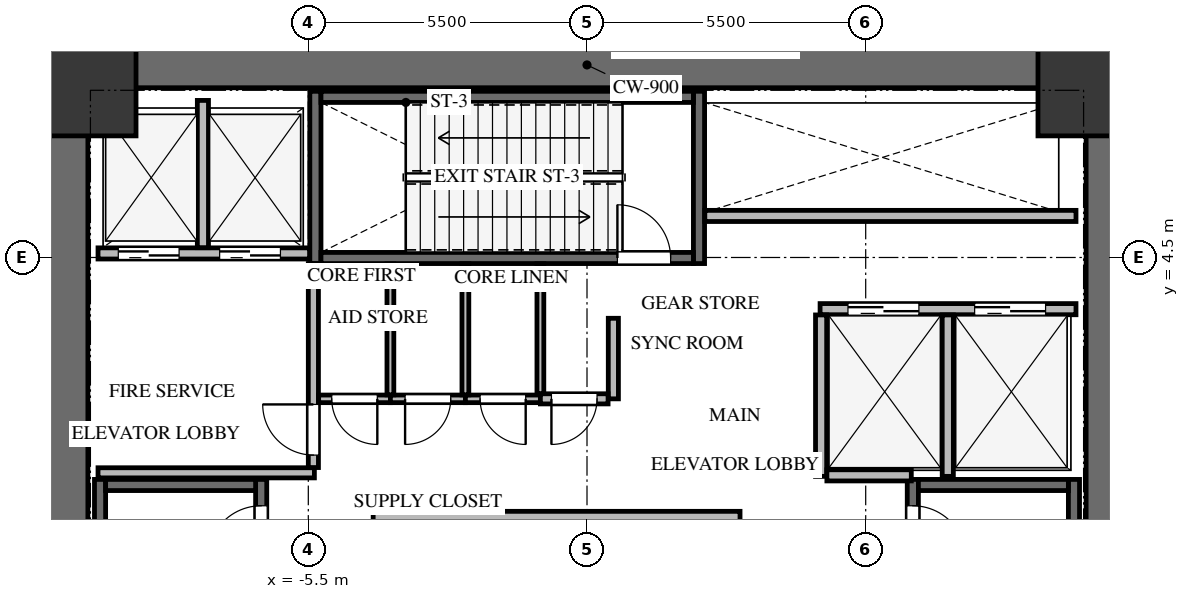
"""IFC4 building model, lengths in metres.
Left out: names, types, materials, properties, quantities, classifications, styles, units other than length and angle.
Written with IfcOpenShell. Run it as: python <this file> out.ifc"""

import sys

from ifc_helpers import new_model, si_unit, direction, frame, frame_2d, origin, origin_2d, place, context, subcontext, project, spatial, rectangle, extrude, source, transform, mapped, element, fill, save


model = new_model("IFC4")
c1 = context("Model", 3, precision=1e-05, world=origin(), true_north=direction((0.0, 1.0)))
c2 = subcontext(c1, "Body", "Model", "MODEL_VIEW")
j1 = project(units=[si_unit("LENGTHUNIT", "METRE"), si_unit("PLANEANGLEUNIT", "RADIAN")], contexts=[c1])
p1 = place(None, origin())
s1 = spatial("IfcSite", under=j1, at=p1, CompositionType="ELEMENT")
p2 = place(p1, origin())
s2 = spatial("IfcBuilding", under=s1, at=p2, CompositionType="ELEMENT")
p3 = place(p2, frame((0.0, 0.0, 26.8)))
s3 = spatial("IfcBuildingStorey", under=s2, at=p3, CompositionType="ELEMENT", Elevation=26.8)
for number, where, z_axis, x_axis in (
    (1, (-10.3, -8.75, 0.0), (0.0, 0.0, 1.0), (0.0, 1.0, 0.0)),
    (2, (10.3, -8.75, 0.0), (0.0, 0.0, 1.0), (0.0, 1.0, 0.0)),
):
    element("IfcWall", number, at=place(p3, frame(where, z_axis=z_axis, x_axis=x_axis)), inside=s3, PredefinedType="SHEAR", context=c2, shape_type="SweptSolid", body=[
        extrude(rectangle(XDim=17.5, YDim=0.9, at=frame_2d((8.75, 0.0))), origin(), (0.0, 0.0, 1.0), 5.6),
    ])
p4 = place(p3, frame((-9.85, 8.3, 0.0), z_axis=(0.0, 0.0, 1.0), x_axis=(1.0, 0.0, 0.0)))
e3 = element("IfcWall", 3, at=p4, inside=s3, PredefinedType="SHEAR", context=c2, shape_type="SweptSolid", body=[
    extrude(rectangle(XDim=19.7, YDim=0.9, at=frame_2d((9.85, 0.0))), origin(), (0.0, 0.0, 1.0), 5.6),
])
p5 = place(p3, frame((-6.43, -7.77, -0.32), z_axis=(0.0, 0.0, 1.0), x_axis=(0.0, 1.0, 0.0)))
e4 = element("IfcWall", 4, at=p5, inside=s3, PredefinedType="SHEAR", context=c2, shape_type="SweptSolid", body=[
    extrude(rectangle(XDim=7.89, YDim=0.22, at=frame_2d((3.945, 0.0))), origin(), (0.0, 0.0, 1.0), 5.68),
])
p6 = place(p5, frame((6.32, 0.0, 0.0)))
e5 = element("IfcOpeningElement", 5, at=p6, cuts=e4, PredefinedType="OPENING", context=c2, shape_type="SweptSolid", body=[
    extrude(rectangle(XDim=1.05, YDim=2.15, at=frame_2d((0.525, 1.075))), frame((0.0, 0.12, 0.0), z_axis=(0.0, -1.0, 0.0), x_axis=(1.0, 0.0, 0.0)), (0.0, 0.0, 1.0), 0.24),
])
p7 = place(p3, frame((-9.61, 0.12, -0.32), z_axis=(0.0, 0.0, 1.0), x_axis=(0.0, -1.0, 0.0)))
e6 = element("IfcWall", 6, at=p7, inside=s3, PredefinedType="SHEAR", context=c2, shape_type="SweptSolid", body=[
    extrude(rectangle(XDim=7.89, YDim=0.22, at=frame_2d((3.945, 0.0))), origin(), (0.0, 0.0, 1.0), 5.68),
])
p8 = place(p3, frame((-6.54, 0.01, -0.32), z_axis=(0.0, 0.0, 1.0), x_axis=(-1.0, 0.0, 0.0)))
e7 = element("IfcWall", 7, at=p8, inside=s3, PredefinedType="SHEAR", context=c2, shape_type="SweptSolid", body=[
    extrude(rectangle(XDim=2.96, YDim=0.22, at=frame_2d((1.48, 0.0))), origin(), (0.0, 0.0, 1.0), 5.68),
])
p9 = place(p3, frame((9.61, -7.77, -0.32), z_axis=(0.0, 0.0, 1.0), x_axis=(0.0, 1.0, 0.0)))
e8 = element("IfcWall", 8, at=p9, inside=s3, PredefinedType="SHEAR", context=c2, shape_type="SweptSolid", body=[
    extrude(rectangle(XDim=7.89, YDim=0.22, at=frame_2d((3.945, 0.0))), origin(), (0.0, 0.0, 1.0), 5.68),
])
p10 = place(p3, frame((6.43, 0.12, -0.32), z_axis=(0.0, 0.0, 1.0), x_axis=(0.0, -1.0, 0.0)))
e9 = element("IfcWall", 9, at=p10, inside=s3, PredefinedType="SHEAR", context=c2, shape_type="SweptSolid", body=[
    extrude(rectangle(XDim=7.89, YDim=0.22, at=frame_2d((3.945, 0.0))), origin(), (0.0, 0.0, 1.0), 5.68),
])
p11 = place(p10, frame((0.52, 0.0, 0.0)))
e10 = element("IfcOpeningElement", 10, at=p11, cuts=e9, PredefinedType="OPENING", context=c2, shape_type="SweptSolid", body=[
    extrude(rectangle(XDim=1.05, YDim=2.15, at=frame_2d((0.525, 1.075))), frame((0.0, 0.12, 0.0), z_axis=(0.0, -1.0, 0.0), x_axis=(1.0, 0.0, 0.0)), (0.0, 0.0, 1.0), 0.24),
])
p12 = place(p3, frame((9.5, 0.01, -0.32), z_axis=(0.0, 0.0, 1.0), x_axis=(-1.0, 0.0, 0.0)))
e11 = element("IfcWall", 11, at=p12, inside=s3, PredefinedType="SHEAR", context=c2, shape_type="SweptSolid", body=[
    extrude(rectangle(XDim=2.96, YDim=0.22, at=frame_2d((1.48, 0.0))), origin(), (0.0, 0.0, 1.0), 5.68),
])
for number, where, z_axis, x_axis in (
    (12, (2.21, 4.38, -0.32), (0.0, 0.0, 1.0), (0.0, 1.0, 0.0)),
    (13, (-5.36, 7.78, -0.32), (0.0, 0.0, 1.0), (0.0, -1.0, 0.0)),
):
    element("IfcWall", number, at=place(p3, frame(where, z_axis=z_axis, x_axis=x_axis)), inside=s3, PredefinedType="SHEAR", context=c2, shape_type="SweptSolid", body=[
        extrude(rectangle(XDim=3.4, YDim=0.22, at=frame_2d((1.7, 0.0))), origin(), (0.0, 0.0, 1.0), 5.68),
    ])
p13 = place(p3, frame((-5.25, 4.49, -0.32), z_axis=(0.0, 0.0, 1.0), x_axis=(1.0, 0.0, 0.0)))
e14 = element("IfcWall", 14, at=p13, inside=s3, PredefinedType="SHEAR", context=c2, shape_type="SweptSolid", body=[
    extrude(rectangle(XDim=7.35, YDim=0.22, at=frame_2d((3.675, 0.0))), origin(), (0.0, 0.0, 1.0), 5.68),
])
p14 = place(p13, frame((5.85, 0.0, 0.0)))
e15 = element("IfcOpeningElement", 15, at=p14, cuts=e14, PredefinedType="OPENING", context=c2, shape_type="SweptSolid", body=[
    extrude(rectangle(XDim=1.05, YDim=2.15, at=frame_2d((0.525, 1.075))), frame((0.0, 0.12, 0.0), z_axis=(0.0, -1.0, 0.0), x_axis=(1.0, 0.0, 0.0)), (0.0, 0.0, 1.0), 0.24),
])
p15 = place(p3, frame((2.1, 7.67, -0.32), z_axis=(0.0, 0.0, 1.0), x_axis=(-1.0, 0.0, 0.0)))
e16 = element("IfcWall", 16, at=p15, inside=s3, PredefinedType="SHEAR", context=c2, shape_type="SweptSolid", body=[
    extrude(rectangle(XDim=7.35, YDim=0.22, at=frame_2d((3.675, 0.0))), origin(), (0.0, 0.0, 1.0), 5.68),
])
m1 = source(origin(), c2, "Body", "SweptSolid", [
    extrude(rectangle(XDim=1.8, YDim=1.8, at=origin_2d()), origin(), (0.0, 0.0, 1.0), 5.68),
])
for number, where, z_axis, x_axis in (
    (17, (9.8, 7.8, -0.32), (0.0, 0.0, 1.0), (1.0, 0.0, 0.0)),
    (18, (-9.8, 7.8, -0.32), (0.0, 0.0, 1.0), (1.0, 0.0, 0.0)),
):
    element("IfcColumn", number, at=place(p3, frame(where, z_axis=z_axis, x_axis=x_axis)), inside=s3, PredefinedType="COLUMN", context=c2, shape_type="MappedRepresentation", body=[
        mapped(m1, transform((0.0, 0.0, 0.0), x_axis=(1.0, 0.0, 0.0), y_axis=(0.0, 1.0, 0.0), z_axis=(0.0, 0.0, 1.0), scale=1.0)),
    ])
p16 = place(p3, frame((-9.65, 4.58, 0.0), z_axis=(0.0, 0.0, 1.0), x_axis=(1.0, 0.0, 0.0)))
e19 = element("IfcWall", 19, at=p16, inside=s3, PredefinedType="SOLIDWALL", context=c2, shape_type="SweptSolid", body=[
    extrude(rectangle(XDim=4.175, YDim=0.22, at=frame_2d((2.087, 0.0))), origin(), (0.0, 0.0, 1.0), 5.345),
])
p17 = place(p16, frame((0.4, 0.0, 0.0)))
e20 = element("IfcOpeningElement", 20, at=p17, cuts=e19, PredefinedType="OPENING", context=c2, shape_type="SweptSolid", body=[
    extrude(rectangle(XDim=1.2, YDim=2.15, at=frame_2d((0.6, 1.075))), frame((0.0, 0.12, 0.0), z_axis=(0.0, -1.0, 0.0), x_axis=(1.0, 0.0, 0.0)), (0.0, 0.0, 1.0), 0.24),
])
p18 = place(p16, frame((2.4, 0.0, 0.0)))
e21 = element("IfcOpeningElement", 21, at=p18, cuts=e19, PredefinedType="OPENING", context=c2, shape_type="SweptSolid", body=[
    extrude(rectangle(XDim=1.2, YDim=2.15, at=frame_2d((0.6, 1.075))), frame((0.0, 0.12, 0.0), z_axis=(0.0, -1.0, 0.0), x_axis=(1.0, 0.0, 0.0)), (0.0, 0.0, 1.0), 0.24),
])
p19 = place(p3, frame((-7.58, 4.694, 0.0), z_axis=(0.0, 0.0, 1.0), x_axis=(0.0, 1.0, 0.0)))
e22 = element("IfcWall", 22, at=p19, inside=s3, PredefinedType="SOLIDWALL", context=c2, shape_type="SweptSolid", body=[
    extrude(rectangle(XDim=2.906, YDim=0.22, at=frame_2d((1.453, 0.0))), origin(), (0.0, 0.0, 1.0), 5.345),
])
p20 = place(p3, frame((-9.65, 0.25, 0.0), z_axis=(0.0, 0.0, 1.0), x_axis=(1.0, 0.0, 0.0)))
e23 = element("IfcWall", 23, at=p20, inside=s3, PredefinedType="SOLIDWALL", context=c2, shape_type="SweptSolid", body=[
    extrude(rectangle(XDim=4.27, YDim=0.2, at=frame_2d((2.135, 0.0))), origin(), (0.0, 0.0, 1.0), 5.345),
])
p21 = place(p3, frame((-5.4, 0.354, 0.0), z_axis=(0.0, 0.0, 1.0), x_axis=(0.0, 1.0, 0.0)))
e24 = element("IfcWall", 24, at=p21, inside=s3, PredefinedType="SOLIDWALL", context=c2, shape_type="SweptSolid", body=[
    extrude(rectangle(XDim=4.026, YDim=0.2, at=frame_2d((2.013, 0.0))), origin(), (0.0, 0.0, 1.0), 5.345),
])
p22 = place(p21, frame((0.246, 0.0, 0.0)))
e25 = element("IfcOpeningElement", 25, at=p22, cuts=e24, PredefinedType="OPENING", context=c2, shape_type="SweptSolid", body=[
    extrude(rectangle(XDim=1.0, YDim=2.15, at=frame_2d((0.5, 1.075))), frame((0.0, 0.11, 0.0), z_axis=(0.0, -1.0, 0.0), x_axis=(1.0, 0.0, 0.0)), (0.0, 0.0, 1.0), 0.22),
])
p23 = place(p3, frame((4.6, 3.48, 0.0), z_axis=(0.0, 0.0, 1.0), x_axis=(1.0, 0.0, 0.0)))
e26 = element("IfcWall", 26, at=p23, inside=s3, PredefinedType="SOLIDWALL", context=c2, shape_type="SweptSolid", body=[
    extrude(rectangle(XDim=5.05, YDim=0.22, at=frame_2d((2.525, 0.0))), origin(), (0.0, 0.0, 1.0), 5.345),
])
p24 = place(p23, frame((0.55, 0.0, 0.0)))
e27 = element("IfcOpeningElement", 27, at=p24, cuts=e26, PredefinedType="OPENING", context=c2, shape_type="SweptSolid", body=[
    extrude(rectangle(XDim=1.4, YDim=2.15, at=frame_2d((0.7, 1.075))), frame((0.0, 0.12, 0.0), z_axis=(0.0, -1.0, 0.0), x_axis=(1.0, 0.0, 0.0)), (0.0, 0.0, 1.0), 0.24),
])
p25 = place(p23, frame((3.05, 0.0, 0.0)))
e28 = element("IfcOpeningElement", 28, at=p25, cuts=e26, PredefinedType="OPENING", context=c2, shape_type="SweptSolid", body=[
    extrude(rectangle(XDim=1.4, YDim=2.15, at=frame_2d((0.7, 1.075))), frame((0.0, 0.12, 0.0), z_axis=(0.0, -1.0, 0.0), x_axis=(1.0, 0.0, 0.0)), (0.0, 0.0, 1.0), 0.24),
])
for number, where, z_axis, x_axis in (
    (29, (4.62, 0.18, 0.0), (0.0, 0.0, 1.0), (0.0, 1.0, 0.0)),
    (30, (7.12, 0.18, 0.0), (0.0, 0.0, 1.0), (0.0, 1.0, 0.0)),
):
    element("IfcWall", number, at=place(p3, frame(where, z_axis=z_axis, x_axis=x_axis)), inside=s3, PredefinedType="SOLIDWALL", context=c2, shape_type="SweptSolid", body=[
        extrude(rectangle(XDim=3.186, YDim=0.22, at=frame_2d((1.593, 0.0))), origin(), (0.0, 0.0, 1.0), 5.345),
    ])
p26 = place(p3, frame((4.734, 0.2, 0.0), z_axis=(0.0, 0.0, 1.0), x_axis=(1.0, 0.0, 0.0)))
e31 = element("IfcWall", 31, at=p26, inside=s3, PredefinedType="SOLIDWALL", context=c2, shape_type="SweptSolid", body=[
    extrude(rectangle(XDim=1.666, YDim=0.22, at=frame_2d((0.833, 0.0))), origin(), (0.0, 0.0, 1.0), 5.345),
])
p27 = place(p3, frame((-4.22, -0.62, 0.0), z_axis=(0.0, 0.0, 1.0), x_axis=(1.0, 0.0, 0.0)))
e32 = element("IfcWall", 32, at=p27, inside=s3, PredefinedType="SOLIDWALL", context=c2, shape_type="SweptSolid", body=[
    extrude(rectangle(XDim=7.24, YDim=0.22, at=frame_2d((3.62, 0.0))), origin(), (0.0, 0.0, 1.0), 5.345),
])
p28 = place(p3, frame((2.325, 5.32, 0.0), z_axis=(0.0, 0.0, 1.0), x_axis=(1.0, 0.0, 0.0)))
e33 = element("IfcWall", 33, at=p28, inside=s3, PredefinedType="SOLIDWALL", context=c2, shape_type="SweptSolid", body=[
    extrude(rectangle(XDim=7.325, YDim=0.22, at=frame_2d((3.663, 0.0))), origin(), (0.0, 0.0, 1.0), 5.345),
])
p29 = place(p3, frame((-3.88, 1.71, 0.0), z_axis=(0.0, 0.0, 1.0), x_axis=(-1.0, 0.0, 0.0)))
e34 = element("IfcWall", 34, at=p29, inside=s3, PredefinedType="PARTITIONING", context=c2, shape_type="SweptSolid", body=[
    extrude(rectangle(XDim=1.416, YDim=0.15, at=frame_2d((0.708, 0.0))), origin(), (0.0, 0.0, 1.0), 5.345),
])
p30 = place(p29, frame((0.258, 0.0, 0.0)))
e35 = element("IfcOpeningElement", 35, at=p30, cuts=e34, PredefinedType="OPENING", context=c2, shape_type="SweptSolid", body=[
    extrude(rectangle(XDim=0.9, YDim=2.05, at=frame_2d((0.45, 1.025))), frame((0.0, 0.085, 0.0), z_axis=(0.0, -1.0, 0.0), x_axis=(1.0, 0.0, 0.0)), (0.0, 0.0, 1.0), 0.17),
])
p31 = place(p3, frame((-2.4, 1.71, 0.0), z_axis=(0.0, 0.0, 1.0), x_axis=(-1.0, 0.0, 0.0)))
e36 = element("IfcWall", 36, at=p31, inside=s3, PredefinedType="PARTITIONING", context=c2, shape_type="SweptSolid", body=[
    extrude(rectangle(XDim=1.48, YDim=0.15, at=frame_2d((0.74, 0.0))), origin(), (0.0, 0.0, 1.0), 5.345),
])
p32 = place(p31, frame((0.29, 0.0, 0.0)))
e37 = element("IfcOpeningElement", 37, at=p32, cuts=e36, PredefinedType="OPENING", context=c2, shape_type="SweptSolid", body=[
    extrude(rectangle(XDim=0.9, YDim=2.05, at=frame_2d((0.45, 1.025))), frame((0.0, 0.085, 0.0), z_axis=(0.0, -1.0, 0.0), x_axis=(1.0, 0.0, 0.0)), (0.0, 0.0, 1.0), 0.17),
])
p33 = place(p3, frame((-0.92, 1.71, 0.0), z_axis=(0.0, 0.0, 1.0), x_axis=(-1.0, 0.0, 0.0)))
e38 = element("IfcWall", 38, at=p33, inside=s3, PredefinedType="PARTITIONING", context=c2, shape_type="SweptSolid", body=[
    extrude(rectangle(XDim=1.48, YDim=0.15, at=frame_2d((0.74, 0.0))), origin(), (0.0, 0.0, 1.0), 5.345),
])
p34 = place(p33, frame((0.29, 0.0, 0.0)))
e39 = element("IfcOpeningElement", 39, at=p34, cuts=e38, PredefinedType="OPENING", context=c2, shape_type="SweptSolid", body=[
    extrude(rectangle(XDim=0.9, YDim=2.05, at=frame_2d((0.45, 1.025))), frame((0.0, 0.085, 0.0), z_axis=(0.0, -1.0, 0.0), x_axis=(1.0, 0.0, 0.0)), (0.0, 0.0, 1.0), 0.17),
])
p35 = place(p3, frame((0.52, 3.3, 0.0), z_axis=(0.0, 0.0, 1.0), x_axis=(0.0, -1.0, 0.0)))
e40 = element("IfcWall", 40, at=p35, inside=s3, PredefinedType="SOLIDWALL", context=c2, shape_type="SweptSolid", body=[
    extrude(rectangle(XDim=1.59, YDim=0.2, at=frame_2d((0.795, 0.0))), origin(), (0.0, 0.0, 1.0), 5.345),
])
p36 = place(p3, frame((0.416, 1.71, 0.0), z_axis=(0.0, 0.0, 1.0), x_axis=(-1.0, 0.0, 0.0)))
e41 = element("IfcWall", 41, at=p36, inside=s3, PredefinedType="SOLIDWALL", context=c2, shape_type="SweptSolid", body=[
    extrude(rectangle(XDim=1.336, YDim=0.2, at=frame_2d((0.668, 0.0))), origin(), (0.0, 0.0, 1.0), 5.345),
])
p37 = place(p36, frame((0.218, 0.0, 0.0)))
e42 = element("IfcOpeningElement", 42, at=p37, cuts=e41, PredefinedType="OPENING", context=c2, shape_type="SweptSolid", body=[
    extrude(rectangle(XDim=0.9, YDim=2.05, at=frame_2d((0.45, 1.025))), frame((0.0, 0.11, 0.0), z_axis=(0.0, -1.0, 0.0), x_axis=(1.0, 0.0, 0.0)), (0.0, 0.0, 1.0), 0.22),
])
for number, where, z_axis, x_axis in (
    (43, (-3.88, 4.375, 0.0), (0.0, 0.0, 1.0), (0.0, -1.0, 0.0)),
    (44, (-2.4, 4.375, 0.0), (0.0, 0.0, 1.0), (0.0, -1.0, 0.0)),
):
    element("IfcWall", number, at=place(p3, frame(where, z_axis=z_axis, x_axis=x_axis)), inside=s3, PredefinedType="PARTITIONING", context=c2, shape_type="SweptSolid", body=[
        extrude(rectangle(XDim=2.586, YDim=0.135, at=frame_2d((1.293, 0.0))), origin(), (0.0, 0.0, 1.0), 5.345),
    ])
p38 = place(p3, frame((-0.92, 4.375, 0.0), z_axis=(0.0, 0.0, 1.0), x_axis=(0.0, -1.0, 0.0)))
e45 = element("IfcWall", 45, at=p38, inside=s3, PredefinedType="PARTITIONING", context=c2, shape_type="SweptSolid", body=[
    extrude(rectangle(XDim=2.561, YDim=0.135, at=frame_2d((1.281, 0.0))), origin(), (0.0, 0.0, 1.0), 5.345),
])
m2 = source(origin(), c2, "Body", "SweptSolid", [
    extrude(rectangle(XDim=1.05, YDim=2.15, at=frame_2d((0.525, 1.075))), frame((0.0, 0.025, 0.0), z_axis=(0.0, -1.0, 0.0), x_axis=(1.0, 0.0, 0.0)), (0.0, 0.0, 1.0), 0.05),
])
p39 = place(p6, origin())
e46 = element("IfcDoor", 46, at=p39, inside=s3, OperationType="SINGLE_SWING_LEFT", PredefinedType="DOOR", context=c2, shape_type="MappedRepresentation", body=[
    mapped(m2, transform((0.0, 0.0, 0.0), x_axis=(1.0, 0.0, 0.0), y_axis=(0.0, 1.0, 0.0), z_axis=(0.0, 0.0, 1.0), scale=1.0)),
])
fill(e5, e46)
m3 = source(origin(), c2, "Body", "SweptSolid", [
    extrude(rectangle(XDim=1.05, YDim=2.15, at=frame_2d((0.525, 1.075))), frame((0.0, 0.025, 0.0), z_axis=(0.0, -1.0, 0.0), x_axis=(1.0, 0.0, 0.0)), (0.0, 0.0, 1.0), 0.05),
])
p40 = place(p11, origin())
e47 = element("IfcDoor", 47, at=p40, inside=s3, OperationType="SINGLE_SWING_RIGHT", PredefinedType="DOOR", context=c2, shape_type="MappedRepresentation", body=[
    mapped(m3, transform((0.0, 0.0, 0.0), x_axis=(1.0, 0.0, 0.0), y_axis=(0.0, 1.0, 0.0), z_axis=(0.0, 0.0, 1.0), scale=1.0)),
])
fill(e10, e47)
p41 = place(p14, origin())
e48 = element("IfcDoor", 48, at=p41, inside=s3, OperationType="SINGLE_SWING_LEFT", PredefinedType="DOOR", context=c2, shape_type="MappedRepresentation", body=[
    mapped(m2, transform((0.0, 0.0, 0.0), x_axis=(1.0, 0.0, 0.0), y_axis=(0.0, 1.0, 0.0), z_axis=(0.0, 0.0, 1.0), scale=1.0)),
])
fill(e15, e48)
m4 = source(origin(), c2, "Body", "SweptSolid", [
    extrude(rectangle(XDim=1.2, YDim=2.15, at=frame_2d((0.6, 1.075))), frame((0.0, 0.025, 0.0), z_axis=(0.0, -1.0, 0.0), x_axis=(1.0, 0.0, 0.0)), (0.0, 0.0, 1.0), 0.05),
])
p42 = place(p17, origin())
e49 = element("IfcDoor", 49, at=p42, inside=s3, OperationType="DOUBLE_DOOR_SLIDING", PredefinedType="DOOR", context=c2, shape_type="MappedRepresentation", body=[
    mapped(m4, transform((0.0, 0.0, 0.0), x_axis=(1.0, 0.0, 0.0), y_axis=(0.0, 1.0, 0.0), z_axis=(0.0, 0.0, 1.0), scale=1.0)),
])
fill(e20, e49)
p43 = place(p18, origin())
e50 = element("IfcDoor", 50, at=p43, inside=s3, OperationType="DOUBLE_DOOR_SLIDING", PredefinedType="DOOR", context=c2, shape_type="MappedRepresentation", body=[
    mapped(m4, transform((0.0, 0.0, 0.0), x_axis=(1.0, 0.0, 0.0), y_axis=(0.0, 1.0, 0.0), z_axis=(0.0, 0.0, 1.0), scale=1.0)),
])
fill(e21, e50)
m5 = source(origin(), c2, "Body", "SweptSolid", [
    extrude(rectangle(XDim=1.0, YDim=2.15, at=frame_2d((0.5, 1.075))), frame((0.0, 0.025, 0.0), z_axis=(0.0, -1.0, 0.0), x_axis=(1.0, 0.0, 0.0)), (0.0, 0.0, 1.0), 0.05),
])
p44 = place(p22, origin())
e51 = element("IfcDoor", 51, at=p44, inside=s3, OperationType="SINGLE_SWING_RIGHT", PredefinedType="DOOR", context=c2, shape_type="MappedRepresentation", body=[
    mapped(m5, transform((0.0, 0.0, 0.0), x_axis=(1.0, 0.0, 0.0), y_axis=(0.0, 1.0, 0.0), z_axis=(0.0, 0.0, 1.0), scale=1.0)),
])
fill(e25, e51)
m6 = source(origin(), c2, "Body", "SweptSolid", [
    extrude(rectangle(XDim=1.4, YDim=2.15, at=frame_2d((0.7, 1.075))), frame((0.0, 0.025, 0.0), z_axis=(0.0, -1.0, 0.0), x_axis=(1.0, 0.0, 0.0)), (0.0, 0.0, 1.0), 0.05),
])
p45 = place(p24, origin())
e52 = element("IfcDoor", 52, at=p45, inside=s3, OperationType="DOUBLE_DOOR_SLIDING", PredefinedType="DOOR", context=c2, shape_type="MappedRepresentation", body=[
    mapped(m6, transform((0.0, 0.0, 0.0), x_axis=(1.0, 0.0, 0.0), y_axis=(0.0, 1.0, 0.0), z_axis=(0.0, 0.0, 1.0), scale=1.0)),
])
fill(e27, e52)
p46 = place(p25, origin())
e53 = element("IfcDoor", 53, at=p46, inside=s3, OperationType="DOUBLE_DOOR_SLIDING", PredefinedType="DOOR", context=c2, shape_type="MappedRepresentation", body=[
    mapped(m6, transform((0.0, 0.0, 0.0), x_axis=(1.0, 0.0, 0.0), y_axis=(0.0, 1.0, 0.0), z_axis=(0.0, 0.0, 1.0), scale=1.0)),
])
fill(e28, e53)
m7 = source(origin(), c2, "Body", "SweptSolid", [
    extrude(rectangle(XDim=0.9, YDim=2.05, at=frame_2d((0.45, 1.025))), frame((0.0, 0.025, 0.0), z_axis=(0.0, -1.0, 0.0), x_axis=(1.0, 0.0, 0.0)), (0.0, 0.0, 1.0), 0.05),
])
p47 = place(p30, origin())
e54 = element("IfcDoor", 54, at=p47, inside=s3, OperationType="SINGLE_SWING_LEFT", PredefinedType="DOOR", context=c2, shape_type="MappedRepresentation", body=[
    mapped(m7, transform((0.0, 0.0, 0.0), x_axis=(1.0, 0.0, 0.0), y_axis=(0.0, 1.0, 0.0), z_axis=(0.0, 0.0, 1.0), scale=1.0)),
])
fill(e35, e54)
m8 = source(origin(), c2, "Body", "SweptSolid", [
    extrude(rectangle(XDim=0.9, YDim=2.05, at=frame_2d((0.45, 1.025))), frame((0.0, 0.025, 0.0), z_axis=(0.0, -1.0, 0.0), x_axis=(1.0, 0.0, 0.0)), (0.0, 0.0, 1.0), 0.05),
])
p48 = place(p32, origin())
e55 = element("IfcDoor", 55, at=p48, inside=s3, OperationType="SINGLE_SWING_RIGHT", PredefinedType="DOOR", context=c2, shape_type="MappedRepresentation", body=[
    mapped(m8, transform((0.0, 0.0, 0.0), x_axis=(1.0, 0.0, 0.0), y_axis=(0.0, 1.0, 0.0), z_axis=(0.0, 0.0, 1.0), scale=1.0)),
])
fill(e37, e55)
p49 = place(p34, origin())
e56 = element("IfcDoor", 56, at=p49, inside=s3, OperationType="SINGLE_SWING_LEFT", PredefinedType="DOOR", context=c2, shape_type="MappedRepresentation", body=[
    mapped(m7, transform((0.0, 0.0, 0.0), x_axis=(1.0, 0.0, 0.0), y_axis=(0.0, 1.0, 0.0), z_axis=(0.0, 0.0, 1.0), scale=1.0)),
])
fill(e39, e56)
p50 = place(p37, origin())
e57 = element("IfcDoor", 57, at=p50, inside=s3, OperationType="SINGLE_SWING_RIGHT", PredefinedType="DOOR", context=c2, shape_type="MappedRepresentation", body=[
    mapped(m8, transform((0.0, 0.0, 0.0), x_axis=(1.0, 0.0, 0.0), y_axis=(0.0, 1.0, 0.0), z_axis=(0.0, 0.0, 1.0), scale=1.0)),
])
fill(e42, e57)
save(model, sys.argv[1])
